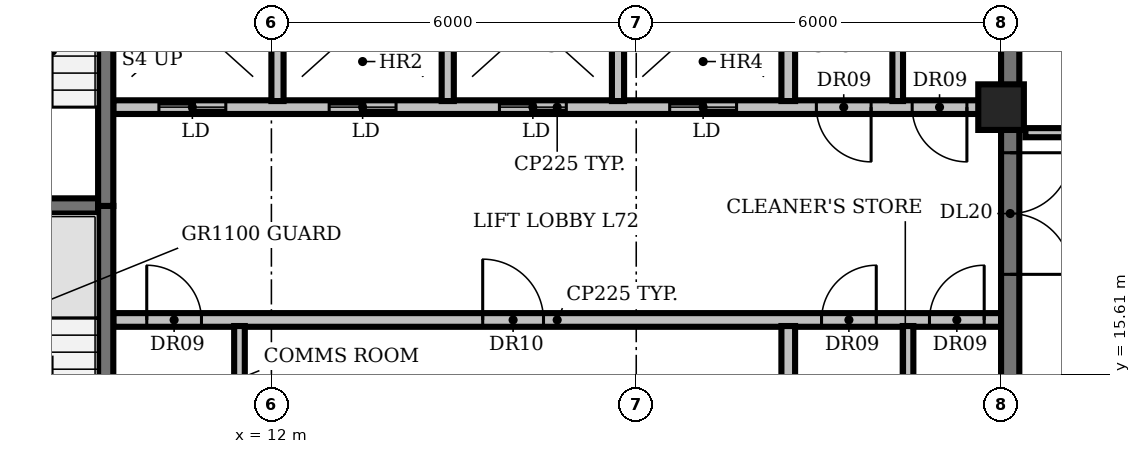
"""IFC4 building model, lengths in metres.
Left out: names, types, materials, properties, quantities, classifications, styles, units other than length and angle.
Written with IfcOpenShell. Run it as: python <this file> out.ifc"""

import sys

from ifc_helpers import new_model, si_unit, direction, frame, frame_2d, origin, origin_2d, place, context, subcontext, project, spatial, rectangle, circle, extrude, element, fill, save


model = new_model("IFC4")
c1 = context("Model", 3, precision=1e-05, world=origin(), true_north=direction((0.0, 1.0)))
c2 = subcontext(c1, "Body", "Model", "MODEL_VIEW")
j1 = project(units=[si_unit("LENGTHUNIT", "METRE"), si_unit("PLANEANGLEUNIT", "RADIAN")], contexts=[c1])
p1 = place(None, origin())
s1 = spatial("IfcSite", under=j1, at=p1, CompositionType="ELEMENT")
p2 = place(p1, origin())
s2 = spatial("IfcBuilding", under=s1, at=p2, CompositionType="ELEMENT")
p3 = place(p2, frame((0.0, 0.0, 323.0)))
s3 = spatial("IfcBuildingStorey", under=s2, at=p3, CompositionType="ELEMENT", Elevation=323.0)
p4 = place(p3, frame((24.0, 20.0, 0.0), z_axis=(0.0, 0.0, 1.0), x_axis=(1.0, 0.0, 0.0)))
e1 = element("IfcColumn", 1, at=p4, inside=s3, PredefinedType="COLUMN", context=c2, shape_type="SweptSolid", body=[
    extrude(circle(Radius=0.375, at=origin_2d()), origin(), (0.0, 0.0, 1.0), 3.9),
])
p5 = place(p3, frame((9.4, 16.5, 0.0), z_axis=(0.0, 0.0, 1.0), x_axis=(1.0, 0.0, 0.0)))
e2 = element("IfcWall", 2, at=p5, inside=s3, PredefinedType="PARTITIONING", context=c2, shape_type="SweptSolid", body=[
    extrude(rectangle(XDim=14.6, YDim=0.225, at=frame_2d((7.3, 0.0))), origin(), (0.0, 0.0, 1.0), 3.9),
])
p6 = place(p5, frame((0.55, 0.0, 0.0)))
e3 = element("IfcOpeningElement", 3, at=p6, cuts=e2, PredefinedType="OPENING", context=c2, shape_type="SweptSolid", body=[
    extrude(rectangle(XDim=0.9, YDim=2.1, at=frame_2d((0.45, 1.05))), frame((0.0, 0.123, 0.0), z_axis=(0.0, -1.0, 0.0), x_axis=(1.0, 0.0, 0.0)), (0.0, 0.0, 1.0), 0.245),
])
p7 = place(p5, frame((6.075, 0.0, 0.0)))
e4 = element("IfcOpeningElement", 4, at=p7, cuts=e2, PredefinedType="OPENING", context=c2, shape_type="SweptSolid", body=[
    extrude(rectangle(XDim=1.0, YDim=2.1, at=frame_2d((0.5, 1.05))), frame((0.0, 0.123, 0.0), z_axis=(0.0, -1.0, 0.0), x_axis=(1.0, 0.0, 0.0)), (0.0, 0.0, 1.0), 0.245),
])
p8 = place(p5, frame((11.647, 0.0, 0.0)))
e5 = element("IfcOpeningElement", 5, at=p8, cuts=e2, PredefinedType="OPENING", context=c2, shape_type="SweptSolid", body=[
    extrude(rectangle(XDim=0.9, YDim=2.1, at=frame_2d((0.45, 1.05))), frame((0.0, 0.123, 0.0), z_axis=(0.0, -1.0, 0.0), x_axis=(1.0, 0.0, 0.0)), (0.0, 0.0, 1.0), 0.245),
])
p9 = place(p5, frame((13.423, 0.0, 0.0)))
e6 = element("IfcOpeningElement", 6, at=p9, cuts=e2, PredefinedType="OPENING", context=c2, shape_type="SweptSolid", body=[
    extrude(rectangle(XDim=0.9, YDim=2.1, at=frame_2d((0.45, 1.05))), frame((0.0, 0.123, 0.0), z_axis=(0.0, -1.0, 0.0), x_axis=(1.0, 0.0, 0.0)), (0.0, 0.0, 1.0), 0.245),
])
p10 = place(p3, frame((6.0, 18.375, 0.0), z_axis=(0.0, 0.0, 1.0), x_axis=(1.0, 0.0, 0.0)))
e7 = element("IfcWall", 7, at=p10, inside=s3, PredefinedType="SHEAR", context=c2, shape_type="SweptSolid", body=[
    extrude(rectangle(XDim=3.15, YDim=0.25, at=frame_2d((1.575, 0.0))), origin(), (0.0, 0.0, 1.0), 3.9),
])
p11 = place(p3, frame((24.0, 20.0, 0.0), z_axis=(0.0, 0.0, 1.0), x_axis=(-1.0, 0.0, 0.0)))
e8 = element("IfcWall", 8, at=p11, inside=s3, PredefinedType="PARTITIONING", context=c2, shape_type="SweptSolid", body=[
    extrude(rectangle(XDim=14.6, YDim=0.225, at=frame_2d((7.3, 0.0))), origin(), (0.0, 0.0, 1.0), 3.9),
])
p12 = place(p11, frame((12.75, 0.0, 0.0)))
e9 = element("IfcOpeningElement", 9, at=p12, cuts=e8, PredefinedType="OPENING", context=c2, shape_type="SweptSolid", body=[
    extrude(rectangle(XDim=1.1, YDim=2.1, at=frame_2d((0.55, 1.05))), frame((0.0, 0.123, 0.0), z_axis=(0.0, -1.0, 0.0), x_axis=(1.0, 0.0, 0.0)), (0.0, 0.0, 1.0), 0.245),
])
p13 = place(p11, frame((9.95, 0.0, 0.0)))
e10 = element("IfcOpeningElement", 10, at=p13, cuts=e8, PredefinedType="OPENING", context=c2, shape_type="SweptSolid", body=[
    extrude(rectangle(XDim=1.1, YDim=2.1, at=frame_2d((0.55, 1.05))), frame((0.0, 0.123, 0.0), z_axis=(0.0, -1.0, 0.0), x_axis=(1.0, 0.0, 0.0)), (0.0, 0.0, 1.0), 0.245),
])
p14 = place(p11, frame((7.15, 0.0, 0.0)))
e11 = element("IfcOpeningElement", 11, at=p14, cuts=e8, PredefinedType="OPENING", context=c2, shape_type="SweptSolid", body=[
    extrude(rectangle(XDim=1.1, YDim=2.1, at=frame_2d((0.55, 1.05))), frame((0.0, 0.123, 0.0), z_axis=(0.0, -1.0, 0.0), x_axis=(1.0, 0.0, 0.0)), (0.0, 0.0, 1.0), 0.245),
])
p15 = place(p11, frame((4.35, 0.0, 0.0)))
e12 = element("IfcOpeningElement", 12, at=p15, cuts=e8, PredefinedType="OPENING", context=c2, shape_type="SweptSolid", body=[
    extrude(rectangle(XDim=1.1, YDim=2.1, at=frame_2d((0.55, 1.05))), frame((0.0, 0.123, 0.0), z_axis=(0.0, -1.0, 0.0), x_axis=(1.0, 0.0, 0.0)), (0.0, 0.0, 1.0), 0.245),
])
p16 = place(p11, frame((2.137, 0.0, 0.0)))
e13 = element("IfcOpeningElement", 13, at=p16, cuts=e8, PredefinedType="OPENING", context=c2, shape_type="SweptSolid", body=[
    extrude(rectangle(XDim=0.9, YDim=2.1, at=frame_2d((0.45, 1.05))), frame((0.0, 0.123, 0.0), z_axis=(0.0, -1.0, 0.0), x_axis=(1.0, 0.0, 0.0)), (0.0, 0.0, 1.0), 0.245),
])
p17 = place(p11, frame((0.562, 0.0, 0.0)))
e14 = element("IfcOpeningElement", 14, at=p17, cuts=e8, PredefinedType="OPENING", context=c2, shape_type="SweptSolid", body=[
    extrude(rectangle(XDim=0.9, YDim=2.1, at=frame_2d((0.45, 1.05))), frame((0.0, 0.123, 0.0), z_axis=(0.0, -1.0, 0.0), x_axis=(1.0, 0.0, 0.0)), (0.0, 0.0, 1.0), 0.245),
])
p18 = place(p3, frame((9.275, 18.375, 0.0), z_axis=(0.0, 0.0, 1.0), x_axis=(0.0, -1.0, 0.0)))
e15 = element("IfcWall", 15, at=p18, inside=s3, PredefinedType="SHEAR", context=c2, shape_type="SweptSolid", body=[
    extrude(rectangle(XDim=6.55, YDim=0.25, at=frame_2d((3.275, 0.0))), origin(), (0.0, 0.0, 1.0), 3.9),
])
p19 = place(p18, frame((5.075, 0.0, 0.0)))
e16 = element("IfcOpeningElement", 16, at=p19, cuts=e15, PredefinedType="OPENING", context=c2, shape_type="SweptSolid", body=[
    extrude(rectangle(XDim=1.0, YDim=2.1, at=frame_2d((0.5, 1.05))), frame((0.0, 0.135, 0.0), z_axis=(0.0, -1.0, 0.0), x_axis=(1.0, 0.0, 0.0)), (0.0, 0.0, 1.0), 0.27),
])
p20 = place(p3, frame((9.275, 18.375, 0.0), z_axis=(0.0, 0.0, 1.0), x_axis=(0.0, 1.0, 0.0)))
e17 = element("IfcWall", 17, at=p20, inside=s3, PredefinedType="SHEAR", context=c2, shape_type="SweptSolid", body=[
    extrude(rectangle(XDim=6.425, YDim=0.25, at=frame_2d((3.212, 0.0))), origin(), (0.0, 0.0, 1.0), 3.9),
])
p21 = place(p3, frame((11.475, 13.8, 0.0), z_axis=(0.0, 0.0, 1.0), x_axis=(0.0, 1.0, 0.0)))
e18 = element("IfcWall", 18, at=p21, inside=s3, PredefinedType="PARTITIONING", context=c2, shape_type="SweptSolid", body=[
    extrude(rectangle(XDim=2.6, YDim=0.175, at=frame_2d((1.3, 0.0))), origin(), (0.0, 0.0, 1.0), 3.9),
])
for number, where, z_axis, x_axis in (
    (19, (12.1, 20.1, 0.0), (0.0, 0.0, 1.0), (0.0, 1.0, 0.0)),
    (20, (14.9, 20.1, 0.0), (0.0, 0.0, 1.0), (0.0, 1.0, 0.0)),
    (21, (17.7, 20.1, 0.0), (0.0, 0.0, 1.0), (0.0, 1.0, 0.0)),
):
    element("IfcWall", number, at=place(p3, frame(where, z_axis=z_axis, x_axis=x_axis)), inside=s3, PredefinedType="SOLIDWALL", context=c2, shape_type="SweptSolid", body=[
        extrude(rectangle(XDim=2.6, YDim=0.2, at=frame_2d((1.3, 0.0))), origin(), (0.0, 0.0, 1.0), 3.9),
    ])
for number, where, z_axis, x_axis in (
    (22, (20.5, 13.8, 0.0), (0.0, 0.0, 1.0), (0.0, 1.0, 0.0)),
    (23, (20.5, 20.1, 0.0), (0.0, 0.0, 1.0), (0.0, 1.0, 0.0)),
):
    element("IfcWall", number, at=place(p3, frame(where, z_axis=z_axis, x_axis=x_axis)), inside=s3, PredefinedType="PARTITIONING", context=c2, shape_type="SweptSolid", body=[
        extrude(rectangle(XDim=2.6, YDim=0.225, at=frame_2d((1.3, 0.0))), origin(), (0.0, 0.0, 1.0), 3.9),
    ])
for number, where, z_axis, x_axis in (
    (24, (22.3, 20.1, 0.0), (0.0, 0.0, 1.0), (0.0, 1.0, 0.0)),
    (25, (22.47, 13.8, 0.0), (0.0, 0.0, 1.0), (0.0, 1.0, 0.0)),
):
    element("IfcWall", number, at=place(p3, frame(where, z_axis=z_axis, x_axis=x_axis)), inside=s3, PredefinedType="PARTITIONING", context=c2, shape_type="SweptSolid", body=[
        extrude(rectangle(XDim=2.6, YDim=0.175, at=frame_2d((1.3, 0.0))), origin(), (0.0, 0.0, 1.0), 3.9),
    ])
p22 = place(p3, frame((24.15, 25.705, 0.0), z_axis=(0.0, 0.0, 1.0), x_axis=(0.0, -1.0, 0.0)))
e26 = element("IfcWall", 26, at=p22, inside=s3, PredefinedType="SHEAR", context=c2, shape_type="SweptSolid", body=[
    extrude(rectangle(XDim=20.605, YDim=0.3, at=frame_2d((10.302, 0.0))), origin(), (0.0, 0.0, 1.0), 3.9),
])
p23 = place(p22, frame((18.555, 0.0, 0.0)))
e27 = element("IfcOpeningElement", 27, at=p23, cuts=e26, PredefinedType="OPENING", context=c2, shape_type="SweptSolid", body=[
    extrude(rectangle(XDim=1.5, YDim=2.1, at=frame_2d((0.75, 1.05))), frame((0.0, 0.16, 0.0), z_axis=(0.0, -1.0, 0.0), x_axis=(1.0, 0.0, 0.0)), (0.0, 0.0, 1.0), 0.32),
])
p24 = place(p22, frame((12.455, 0.0, 0.0)))
e28 = element("IfcOpeningElement", 28, at=p24, cuts=e26, PredefinedType="OPENING", context=c2, shape_type="SweptSolid", body=[
    extrude(rectangle(XDim=0.9, YDim=2.1, at=frame_2d((0.45, 1.05))), frame((0.0, 0.16, 0.0), z_axis=(0.0, -1.0, 0.0), x_axis=(1.0, 0.0, 0.0)), (0.0, 0.0, 1.0), 0.32),
])
p25 = place(p22, frame((6.455, 0.0, 0.0)))
e29 = element("IfcOpeningElement", 29, at=p25, cuts=e26, PredefinedType="OPENING", context=c2, shape_type="SweptSolid", body=[
    extrude(rectangle(XDim=2.0, YDim=2.1, at=frame_2d((1.0, 1.05))), frame((0.0, 0.16, 0.0), z_axis=(0.0, -1.0, 0.0), x_axis=(1.0, 0.0, 0.0)), (0.0, 0.0, 1.0), 0.32),
])
p26 = place(p3, frame((24.4, 19.58, 0.0), z_axis=(0.0, 0.0, 1.0), x_axis=(1.0, 0.0, 0.0)))
e30 = element("IfcWall", 30, at=p26, inside=s3, PredefinedType="PARTITIONING", context=c2, shape_type="SweptSolid", body=[
    extrude(rectangle(XDim=2.075, YDim=0.15, at=frame_2d((1.038, 0.0))), origin(), (0.0, 0.0, 1.0), 2.48),
])
p27 = place(p6, origin())
e31 = element("IfcDoor", 31, at=p27, inside=s3, OperationType="SINGLE_SWING_LEFT", PredefinedType="DOOR", context=c2, shape_type="SweptSolid", body=[
    extrude(rectangle(XDim=0.9, YDim=2.1, at=frame_2d((0.45, 1.05))), frame((0.0, 0.025, 0.0), z_axis=(0.0, -1.0, 0.0), x_axis=(1.0, 0.0, 0.0)), (0.0, 0.0, 1.0), 0.05),
])
fill(e3, e31)
p28 = place(p7, origin())
e32 = element("IfcDoor", 32, at=p28, inside=s3, OperationType="SINGLE_SWING_LEFT", PredefinedType="DOOR", context=c2, shape_type="SweptSolid", body=[
    extrude(rectangle(XDim=1.0, YDim=2.1, at=frame_2d((0.5, 1.05))), frame((0.0, 0.025, 0.0), z_axis=(0.0, -1.0, 0.0), x_axis=(1.0, 0.0, 0.0)), (0.0, 0.0, 1.0), 0.05),
])
fill(e4, e32)
p29 = place(p8, origin())
e33 = element("IfcDoor", 33, at=p29, inside=s3, OperationType="SINGLE_SWING_RIGHT", PredefinedType="DOOR", context=c2, shape_type="SweptSolid", body=[
    extrude(rectangle(XDim=0.9, YDim=2.1, at=frame_2d((0.45, 1.05))), frame((0.0, 0.025, 0.0), z_axis=(0.0, -1.0, 0.0), x_axis=(1.0, 0.0, 0.0)), (0.0, 0.0, 1.0), 0.05),
])
fill(e5, e33)
p30 = place(p9, origin())
e34 = element("IfcDoor", 34, at=p30, inside=s3, OperationType="SINGLE_SWING_RIGHT", PredefinedType="DOOR", context=c2, shape_type="SweptSolid", body=[
    extrude(rectangle(XDim=0.9, YDim=2.1, at=frame_2d((0.45, 1.05))), frame((0.0, 0.025, 0.0), z_axis=(0.0, -1.0, 0.0), x_axis=(1.0, 0.0, 0.0)), (0.0, 0.0, 1.0), 0.05),
])
fill(e6, e34)
p31 = place(p12, origin())
e35 = element("IfcDoor", 35, at=p31, inside=s3, OperationType="DOUBLE_DOOR_SLIDING", PredefinedType="DOOR", context=c2, shape_type="SweptSolid", body=[
    extrude(rectangle(XDim=1.1, YDim=2.1, at=frame_2d((0.55, 1.05))), frame((0.0, 0.025, 0.0), z_axis=(0.0, -1.0, 0.0), x_axis=(1.0, 0.0, 0.0)), (0.0, 0.0, 1.0), 0.05),
])
fill(e9, e35)
p32 = place(p13, origin())
e36 = element("IfcDoor", 36, at=p32, inside=s3, OperationType="DOUBLE_DOOR_SLIDING", PredefinedType="DOOR", context=c2, shape_type="SweptSolid", body=[
    extrude(rectangle(XDim=1.1, YDim=2.1, at=frame_2d((0.55, 1.05))), frame((0.0, 0.025, 0.0), z_axis=(0.0, -1.0, 0.0), x_axis=(1.0, 0.0, 0.0)), (0.0, 0.0, 1.0), 0.05),
])
fill(e10, e36)
p33 = place(p14, origin())
e37 = element("IfcDoor", 37, at=p33, inside=s3, OperationType="DOUBLE_DOOR_SLIDING", PredefinedType="DOOR", context=c2, shape_type="SweptSolid", body=[
    extrude(rectangle(XDim=1.1, YDim=2.1, at=frame_2d((0.55, 1.05))), frame((0.0, 0.025, 0.0), z_axis=(0.0, -1.0, 0.0), x_axis=(1.0, 0.0, 0.0)), (0.0, 0.0, 1.0), 0.05),
])
fill(e11, e37)
p34 = place(p15, origin())
e38 = element("IfcDoor", 38, at=p34, inside=s3, OperationType="DOUBLE_DOOR_SLIDING", PredefinedType="DOOR", context=c2, shape_type="SweptSolid", body=[
    extrude(rectangle(XDim=1.1, YDim=2.1, at=frame_2d((0.55, 1.05))), frame((0.0, 0.025, 0.0), z_axis=(0.0, -1.0, 0.0), x_axis=(1.0, 0.0, 0.0)), (0.0, 0.0, 1.0), 0.05),
])
fill(e12, e38)
p35 = place(p16, origin())
e39 = element("IfcDoor", 39, at=p35, inside=s3, OperationType="SINGLE_SWING_LEFT", PredefinedType="DOOR", context=c2, shape_type="SweptSolid", body=[
    extrude(rectangle(XDim=0.9, YDim=2.1, at=frame_2d((0.45, 1.05))), frame((0.0, 0.025, 0.0), z_axis=(0.0, -1.0, 0.0), x_axis=(1.0, 0.0, 0.0)), (0.0, 0.0, 1.0), 0.05),
])
fill(e13, e39)
p36 = place(p17, origin())
e40 = element("IfcDoor", 40, at=p36, inside=s3, OperationType="SINGLE_SWING_LEFT", PredefinedType="DOOR", context=c2, shape_type="SweptSolid", body=[
    extrude(rectangle(XDim=0.9, YDim=2.1, at=frame_2d((0.45, 1.05))), frame((0.0, 0.025, 0.0), z_axis=(0.0, -1.0, 0.0), x_axis=(1.0, 0.0, 0.0)), (0.0, 0.0, 1.0), 0.05),
])
fill(e14, e40)
p37 = place(p25, origin())
e41 = element("IfcDoor", 41, at=p37, inside=s3, OperationType="DOUBLE_DOOR_SINGLE_SWING", PredefinedType="DOOR", context=c2, shape_type="SweptSolid", body=[
    extrude(rectangle(XDim=2.0, YDim=2.1, at=frame_2d((1.0, 1.05))), frame((0.0, 0.025, 0.0), z_axis=(0.0, -1.0, 0.0), x_axis=(1.0, 0.0, 0.0)), (0.0, 0.0, 1.0), 0.05),
])
fill(e29, e41)
save(model, sys.argv[1])
